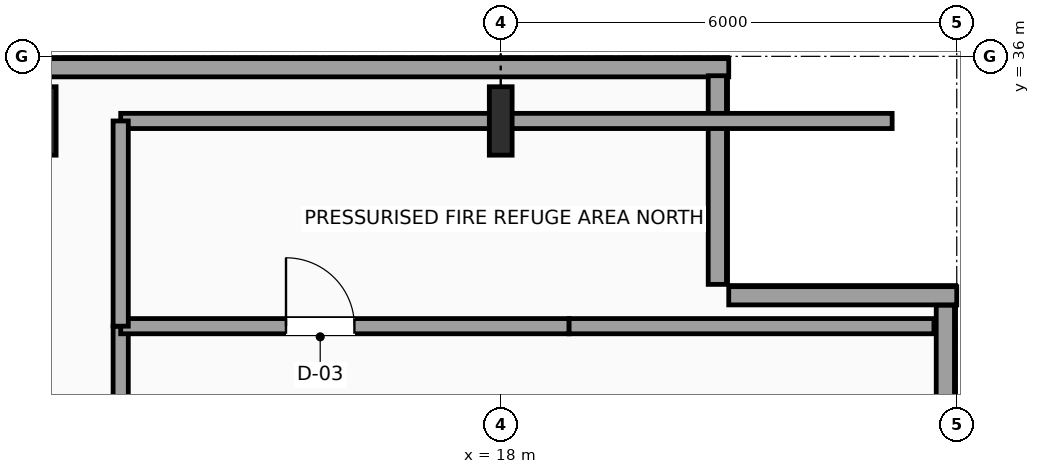
"""IFC4 building model, lengths in metres.
Left out: names, types, materials, properties, quantities, classifications, styles, units other than length and angle.
Written with IfcOpenShell. Run it as: python <this file> out.ifc"""

import sys

from ifc_helpers import new_model, si_unit, direction, frame, frame_2d, origin, origin_2d, place, context, subcontext, project, spatial, rectangle, i_section, extrude, element, fill, save


model = new_model("IFC4")
c1 = context("Model", 3, precision=1e-05, world=origin(), true_north=direction((0.0, 1.0)))
c2 = subcontext(c1, "Body", "Model", "MODEL_VIEW")
j1 = project(units=[si_unit("LENGTHUNIT", "METRE"), si_unit("PLANEANGLEUNIT", "RADIAN")], contexts=[c1])
p1 = place(None, origin())
s1 = spatial("IfcSite", under=j1, at=p1, CompositionType="ELEMENT")
p2 = place(p1, origin())
s2 = spatial("IfcBuilding", under=s1, at=p2, CompositionType="ELEMENT")
p3 = place(p2, frame((0.0, 0.0, 234.9)))
s3 = spatial("IfcBuildingStorey", under=s2, at=p3, CompositionType="ELEMENT", Elevation=234.9)
for number, where, z_axis, x_axis in (
    (1, (12.0, 35.15, 0.0), (0.0, 0.0, 1.0), (1.0, 0.0, 0.0)),
    (2, (18.0, 35.15, 0.0), (0.0, 0.0, 1.0), (1.0, 0.0, 0.0)),
):
    element("IfcColumn", number, at=place(p3, frame(where, z_axis=z_axis, x_axis=x_axis)), inside=s3, PredefinedType="COLUMN", context=c2, shape_type="SweptSolid", body=[
        extrude(i_section(OverallWidth=0.3, OverallDepth=0.9, WebThickness=0.019, FlangeThickness=0.035, FilletRadius=0.03, at=origin_2d()), origin(), (0.0, 0.0, 1.0), 4.56),
    ])
p4 = place(p3, frame((3.0, 35.85, 0.0), z_axis=(0.0, 0.0, 1.0), x_axis=(1.0, 0.0, 0.0)))
e3 = element("IfcWall", 3, at=p4, inside=s3, PredefinedType="SOLIDWALL", context=c2, shape_type="SweptSolid", body=[
    extrude(rectangle(XDim=18.0, YDim=0.24, at=frame_2d((9.0, 0.0))), origin(), (0.0, 0.0, 1.0), 4.6),
])
p5 = place(p3, frame((20.85, 35.745, 0.0), z_axis=(0.0, 0.0, 1.0), x_axis=(0.0, -1.0, 0.0)))
e4 = element("IfcWall", 4, at=p5, inside=s3, PredefinedType="SOLIDWALL", context=c2, shape_type="SweptSolid", body=[
    extrude(rectangle(XDim=2.745, YDim=0.24, at=frame_2d((1.373, 0.0))), origin(), (0.0, 0.0, 1.0), 4.6),
])
p6 = place(p3, frame((21.0, 32.85, 0.0), z_axis=(0.0, 0.0, 1.0), x_axis=(1.0, 0.0, 0.0)))
e5 = element("IfcWall", 5, at=p6, inside=s3, PredefinedType="SOLIDWALL", context=c2, shape_type="SweptSolid", body=[
    extrude(rectangle(XDim=3.0, YDim=0.24, at=frame_2d((1.5, 0.0))), origin(), (0.0, 0.0, 1.0), 4.6),
])
p7 = place(p3, frame((23.85, 32.725, 0.0), z_axis=(0.0, 0.0, 1.0), x_axis=(0.0, -1.0, 0.0)))
e6 = element("IfcWall", 6, at=p7, inside=s3, PredefinedType="SOLIDWALL", context=c2, shape_type="SweptSolid", body=[
    extrude(rectangle(XDim=8.725, YDim=0.24, at=frame_2d((4.363, 0.0))), origin(), (0.0, 0.0, 1.0), 4.6),
])
p8 = place(p3, frame((13.0, 30.1, 0.0), z_axis=(0.0, 0.0, 1.0), x_axis=(0.0, 1.0, 0.0)))
e7 = element("IfcWall", 7, at=p8, inside=s3, PredefinedType="SOLIDWALL", context=c2, shape_type="SweptSolid", body=[
    extrude(rectangle(XDim=2.35, YDim=0.2, at=frame_2d((1.175, 0.0))), origin(), (0.0, 0.0, 1.0), 4.6),
])
p9 = place(p3, frame((13.0, 32.45, 0.0), z_axis=(0.0, 0.0, 1.0), x_axis=(1.0, 0.0, 0.0)))
e8 = element("IfcWall", 8, at=p9, inside=s3, PredefinedType="SOLIDWALL", context=c2, shape_type="SweptSolid", body=[
    extrude(rectangle(XDim=5.9, YDim=0.2, at=frame_2d((2.95, 0.0))), origin(), (0.0, 0.0, 1.0), 4.6),
])
p10 = place(p9, frame((2.175, 0.0, 0.0)))
e9 = element("IfcOpeningElement", 9, at=p10, cuts=e8, PredefinedType="OPENING", context=c2, shape_type="SweptSolid", body=[
    extrude(rectangle(XDim=0.9, YDim=2.15, at=frame_2d((0.45, 1.075))), frame((0.0, 0.11, 0.0), z_axis=(0.0, -1.0, 0.0), x_axis=(1.0, 0.0, 0.0)), (0.0, 0.0, 1.0), 0.22),
])
p11 = place(p3, frame((18.9, 32.45, 0.0), z_axis=(0.0, 0.0, 1.0), x_axis=(1.0, 0.0, 0.0)))
e10 = element("IfcWall", 10, at=p11, inside=s3, PredefinedType="SOLIDWALL", context=c2, shape_type="SweptSolid", body=[
    extrude(rectangle(XDim=4.8, YDim=0.2, at=frame_2d((2.4, 0.0))), origin(), (0.0, 0.0, 1.0), 4.6),
])
p12 = place(p3, frame((13.0, 35.15, 0.0), z_axis=(0.0, 0.0, 1.0), x_axis=(1.0, 0.0, 0.0)))
e11 = element("IfcWall", 11, at=p12, inside=s3, PredefinedType="SOLIDWALL", context=c2, shape_type="SweptSolid", body=[
    extrude(rectangle(XDim=10.15, YDim=0.2, at=frame_2d((5.075, 0.0))), origin(), (0.0, 0.0, 1.0), 4.052),
])
p13 = place(p3, frame((13.0, 32.45, 0.0), z_axis=(0.0, 0.0, 1.0), x_axis=(0.0, 1.0, 0.0)))
e12 = element("IfcWall", 12, at=p13, inside=s3, PredefinedType="SOLIDWALL", context=c2, shape_type="SweptSolid", body=[
    extrude(rectangle(XDim=2.7, YDim=0.2, at=frame_2d((1.35, 0.0))), origin(), (0.0, 0.0, 1.0), 4.6),
])
p14 = place(p10, origin())
e13 = element("IfcDoor", 13, at=p14, inside=s3, OperationType="SINGLE_SWING_LEFT", PredefinedType="DOOR", context=c2, shape_type="SweptSolid", body=[
    extrude(rectangle(XDim=0.9, YDim=2.15, at=frame_2d((0.45, 1.075))), frame((0.0, 0.025, 0.0), z_axis=(0.0, -1.0, 0.0), x_axis=(1.0, 0.0, 0.0)), (0.0, 0.0, 1.0), 0.05),
])
fill(e9, e13)
save(model, sys.argv[1])
